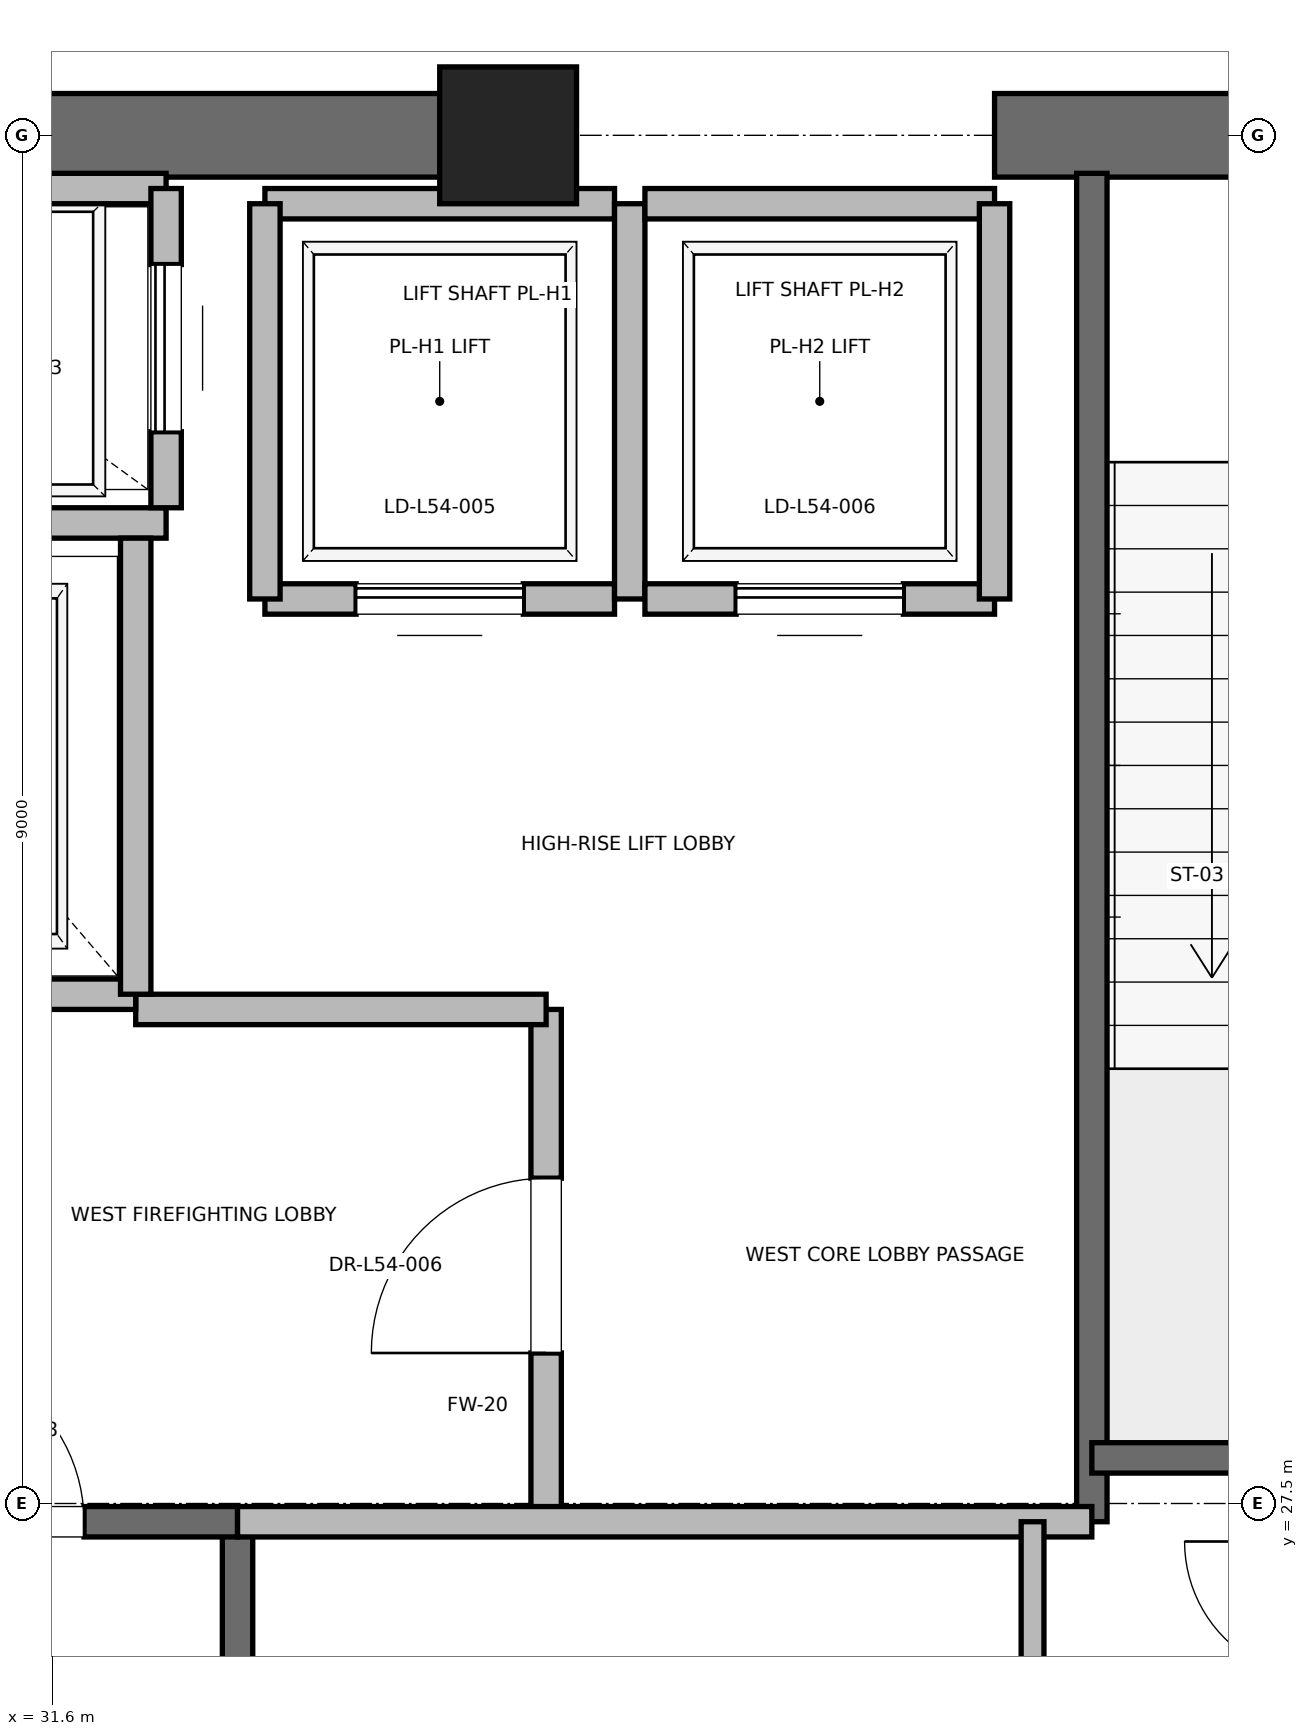
"""IFC4 building model, lengths in metres.
Left out: names, types, materials, properties, quantities, classifications, styles, units other than length and angle.
Written with IfcOpenShell. Run it as: python <this file> out.ifc"""

import sys

from ifc_helpers import new_model, si_unit, direction, frame, frame_2d, origin, origin_2d, place, context, subcontext, project, spatial, rectangle, extrude, element, fill, save


model = new_model("IFC4")
c1 = context("Model", 3, precision=1e-05, world=origin(), true_north=direction((0.0, 1.0)))
c2 = subcontext(c1, "Body", "Model", "MODEL_VIEW")
j1 = project(units=[si_unit("LENGTHUNIT", "METRE"), si_unit("PLANEANGLEUNIT", "RADIAN")], contexts=[c1])
p1 = place(None, origin())
s1 = spatial("IfcSite", under=j1, at=p1, CompositionType="ELEMENT")
p2 = place(p1, origin())
s2 = spatial("IfcBuilding", under=s1, at=p2, CompositionType="ELEMENT")
p3 = place(p2, frame((0.0, 0.0, 233.2)))
s3 = spatial("IfcBuildingStorey", under=s2, at=p3, CompositionType="ELEMENT", Elevation=233.2)
p4 = place(p3, frame((34.6, 36.5, 0.0), z_axis=(0.0, 0.0, 1.0), x_axis=(1.0, 0.0, 0.0)))
e1 = element("IfcColumn", 1, at=p4, inside=s3, PredefinedType="PILASTER", context=c2, shape_type="SweptSolid", body=[
    extrude(rectangle(XDim=0.9, YDim=0.9, at=origin_2d()), origin(), (0.0, 0.0, 1.0), 5.0),
])
p5 = place(p3, frame((29.0, 36.5, 0.0), z_axis=(0.0, 0.0, 1.0), x_axis=(1.0, 0.0, 0.0)))
e2 = element("IfcWall", 2, at=p5, inside=s3, PredefinedType="SHEAR", context=c2, shape_type="SweptSolid", body=[
    extrude(rectangle(XDim=5.8, YDim=0.55, at=frame_2d((2.9, 0.0))), origin(), (0.0, 0.0, 1.0), 4.7),
])
p6 = place(p3, frame((37.8, 36.5, 0.0), z_axis=(0.0, 0.0, 1.0), x_axis=(1.0, 0.0, 0.0)))
e3 = element("IfcWall", 3, at=p6, inside=s3, PredefinedType="SHEAR", context=c2, shape_type="SweptSolid", body=[
    extrude(rectangle(XDim=4.4, YDim=0.55, at=frame_2d((2.2, 0.0))), origin(), (0.0, 0.0, 1.0), 4.7),
])
p7 = place(p6, frame((1.65, 0.0, 0.0)))
e4 = element("IfcOpeningElement", 4, at=p7, cuts=e3, PredefinedType="OPENING", context=c2, shape_type="SweptSolid", body=[
    extrude(rectangle(XDim=1.1, YDim=2.15, at=frame_2d((0.55, 1.075))), frame((0.0, 0.275, 0.0), z_axis=(0.0, -1.0, 0.0), x_axis=(1.0, 0.0, 0.0)), (0.0, 0.0, 1.0), 0.55),
])
p8 = place(p3, frame((32.82, 18.6, 0.0), z_axis=(0.0, 0.0, 1.0), x_axis=(0.0, 1.0, 0.0)))
e5 = element("IfcWall", 5, at=p8, inside=s3, PredefinedType="SOLIDWALL", context=c2, shape_type="SweptSolid", body=[
    extrude(rectangle(XDim=8.78, YDim=0.2, at=frame_2d((4.39, 0.0))), origin(), (0.0, 0.0, 1.0), 4.7),
])
p9 = place(p3, frame((29.7, 27.38, 0.0), z_axis=(0.0, 0.0, 1.0), x_axis=(1.0, 0.0, 0.0)))
e6 = element("IfcWall", 6, at=p9, inside=s3, PredefinedType="SOLIDWALL", context=c2, shape_type="SweptSolid", body=[
    extrude(rectangle(XDim=3.12, YDim=0.2, at=frame_2d((1.56, 0.0))), origin(), (0.0, 0.0, 1.0), 4.7),
])
p10 = place(p9, frame((1.01, 0.0, 0.0)))
e7 = element("IfcOpeningElement", 7, at=p10, cuts=e6, PredefinedType="OPENING", context=c2, shape_type="SweptSolid", body=[
    extrude(rectangle(XDim=1.1, YDim=2.15, at=frame_2d((0.55, 1.075))), frame((0.0, 0.1, 0.0), z_axis=(0.0, -1.0, 0.0), x_axis=(1.0, 0.0, 0.0)), (0.0, 0.0, 1.0), 0.2),
])
p11 = place(p3, frame((38.44, 27.38, 0.0), z_axis=(0.0, 0.0, 1.0), x_axis=(0.0, 1.0, 0.0)))
e8 = element("IfcWall", 8, at=p11, inside=s3, PredefinedType="SOLIDWALL", context=c2, shape_type="SweptSolid", body=[
    extrude(rectangle(XDim=8.87, YDim=0.2, at=frame_2d((4.435, 0.0))), origin(), (0.0, 0.0, 1.0), 4.7),
])
p12 = place(p3, frame((38.44, 27.8, 0.0), z_axis=(0.0, 0.0, 1.0), x_axis=(1.0, 0.0, 0.0)))
e9 = element("IfcWall", 9, at=p12, inside=s3, PredefinedType="SOLIDWALL", context=c2, shape_type="SweptSolid", body=[
    extrude(rectangle(XDim=3.32, YDim=0.2, at=frame_2d((1.66, 0.0))), origin(), (0.0, 0.0, 1.0), 4.7),
])
p13 = place(p3, frame((34.85, 27.38, 0.0), z_axis=(0.0, 0.0, 1.0), x_axis=(0.0, 1.0, 0.0)))
e10 = element("IfcWall", 10, at=p13, inside=s3, PredefinedType="PARTITIONING", context=c2, shape_type="SweptSolid", body=[
    extrude(rectangle(XDim=3.37, YDim=0.2, at=frame_2d((1.685, 0.0))), origin(), (0.0, 0.0, 1.0), 4.7),
])
p14 = place(p13, frame((1.11, 0.0, 0.0)))
e11 = element("IfcOpeningElement", 11, at=p14, cuts=e10, PredefinedType="OPENING", context=c2, shape_type="SweptSolid", body=[
    extrude(rectangle(XDim=1.15, YDim=2.2, at=frame_2d((0.575, 1.1))), frame((0.0, 0.1, 0.0), z_axis=(0.0, -1.0, 0.0), x_axis=(1.0, 0.0, 0.0)), (0.0, 0.0, 1.0), 0.2),
])
p15 = place(p3, frame((32.82, 27.38, 0.0), z_axis=(0.0, 0.0, 1.0), x_axis=(1.0, 0.0, 0.0)))
e12 = element("IfcWall", 12, at=p15, inside=s3, PredefinedType="PARTITIONING", context=c2, shape_type="SweptSolid", body=[
    extrude(rectangle(XDim=5.62, YDim=0.2, at=frame_2d((2.81, 0.0))), origin(), (0.0, 0.0, 1.0), 4.7),
])
p16 = place(p3, frame((32.15, 30.75, 0.0), z_axis=(0.0, 0.0, 1.0), x_axis=(1.0, 0.0, 0.0)))
e13 = element("IfcWall", 13, at=p16, inside=s3, PredefinedType="PARTITIONING", context=c2, shape_type="SweptSolid", body=[
    extrude(rectangle(XDim=2.7, YDim=0.2, at=frame_2d((1.35, 0.0))), origin(), (0.0, 0.0, 1.0), 4.7),
])
p17 = place(p3, frame((29.55, 30.85, 0.0), z_axis=(0.0, 0.0, 1.0), x_axis=(1.0, 0.0, 0.0)))
e14 = element("IfcWall", 14, at=p17, inside=s3, PredefinedType="SOLIDWALL", context=c2, shape_type="SweptSolid", body=[
    extrude(rectangle(XDim=2.6, YDim=0.2, at=frame_2d((1.3, 0.0))), origin(), (0.0, 0.0, 1.0), 3.68),
])
p18 = place(p17, frame((0.75, 0.0, 0.0)))
e15 = element("IfcOpeningElement", 15, at=p18, cuts=e14, PredefinedType="OPENING", context=c2, shape_type="SweptSolid", body=[
    extrude(rectangle(XDim=1.1, YDim=2.2, at=frame_2d((0.55, 1.1))), frame((0.0, 0.1, 0.0), z_axis=(0.0, -1.0, 0.0), x_axis=(1.0, 0.0, 0.0)), (0.0, 0.0, 1.0), 0.2),
])
p19 = place(p3, frame((29.55, 33.95, 0.0), z_axis=(0.0, 0.0, 1.0), x_axis=(1.0, 0.0, 0.0)))
e16 = element("IfcWall", 16, at=p19, inside=s3, PredefinedType="SOLIDWALL", context=c2, shape_type="SweptSolid", body=[
    extrude(rectangle(XDim=2.8, YDim=0.2, at=frame_2d((1.4, 0.0))), origin(), (0.0, 0.0, 1.0), 4.7),
])
p20 = place(p3, frame((32.15, 30.85, 0.0), z_axis=(0.0, 0.0, 1.0), x_axis=(0.0, 1.0, 0.0)))
e17 = element("IfcWall", 17, at=p20, inside=s3, PredefinedType="SOLIDWALL", context=c2, shape_type="SweptSolid", body=[
    extrude(rectangle(XDim=3.0, YDim=0.2, at=frame_2d((1.5, 0.0))), origin(), (0.0, 0.0, 1.0), 4.7),
])
p21 = place(p3, frame((32.35, 36.15, 0.0), z_axis=(0.0, 0.0, 1.0), x_axis=(-1.0, 0.0, 0.0)))
e18 = element("IfcWall", 18, at=p21, inside=s3, PredefinedType="SOLIDWALL", context=c2, shape_type="SweptSolid", body=[
    extrude(rectangle(XDim=2.8, YDim=0.2, at=frame_2d((1.4, 0.0))), origin(), (0.0, 0.0, 1.0), 3.987),
])
p22 = place(p3, frame((32.35, 34.05, 0.0), z_axis=(0.0, 0.0, 1.0), x_axis=(0.0, 1.0, 0.0)))
e19 = element("IfcWall", 19, at=p22, inside=s3, PredefinedType="SOLIDWALL", context=c2, shape_type="SweptSolid", body=[
    extrude(rectangle(XDim=2.1, YDim=0.2, at=frame_2d((1.05, 0.0))), origin(), (0.0, 0.0, 1.0), 4.7),
])
p23 = place(p22, frame((0.5, 0.0, 0.0)))
e20 = element("IfcOpeningElement", 20, at=p23, cuts=e19, PredefinedType="OPENING", context=c2, shape_type="SweptSolid", body=[
    extrude(rectangle(XDim=1.1, YDim=2.2, at=frame_2d((0.55, 1.1))), frame((0.0, 0.1, 0.0), z_axis=(0.0, -1.0, 0.0), x_axis=(1.0, 0.0, 0.0)), (0.0, 0.0, 1.0), 0.2),
])
p24 = place(p3, frame((33.0, 33.45, 0.0), z_axis=(0.0, 0.0, 1.0), x_axis=(1.0, 0.0, 0.0)))
e21 = element("IfcWall", 21, at=p24, inside=s3, PredefinedType="SOLIDWALL", context=c2, shape_type="SweptSolid", body=[
    extrude(rectangle(XDim=2.3, YDim=0.2, at=frame_2d((1.15, 0.0))), origin(), (0.0, 0.0, 1.0), 4.7),
])
p25 = place(p24, frame((0.6, 0.0, 0.0)))
e22 = element("IfcOpeningElement", 22, at=p25, cuts=e21, PredefinedType="OPENING", context=c2, shape_type="SweptSolid", body=[
    extrude(rectangle(XDim=1.1, YDim=2.2, at=frame_2d((0.55, 1.1))), frame((0.0, 0.1, 0.0), z_axis=(0.0, -1.0, 0.0), x_axis=(1.0, 0.0, 0.0)), (0.0, 0.0, 1.0), 0.2),
])
p26 = place(p3, frame((35.3, 36.05, 0.0), z_axis=(0.0, 0.0, 1.0), x_axis=(-1.0, 0.0, 0.0)))
e23 = element("IfcWall", 23, at=p26, inside=s3, PredefinedType="SOLIDWALL", context=c2, shape_type="SweptSolid", body=[
    extrude(rectangle(XDim=2.3, YDim=0.2, at=frame_2d((1.15, 0.0))), origin(), (0.0, 0.0, 1.0), 3.68),
])
p27 = place(p3, frame((33.0, 36.05, 0.0), z_axis=(0.0, 0.0, 1.0), x_axis=(0.0, -1.0, 0.0)))
e24 = element("IfcWall", 24, at=p27, inside=s3, PredefinedType="SOLIDWALL", context=c2, shape_type="SweptSolid", body=[
    extrude(rectangle(XDim=2.6, YDim=0.2, at=frame_2d((1.3, 0.0))), origin(), (0.0, 0.0, 1.0), 4.7),
])
p28 = place(p3, frame((35.4, 33.45, 0.0), z_axis=(0.0, 0.0, 1.0), x_axis=(0.0, 1.0, 0.0)))
e25 = element("IfcWall", 25, at=p28, inside=s3, PredefinedType="SOLIDWALL", context=c2, shape_type="SweptSolid", body=[
    extrude(rectangle(XDim=2.6, YDim=0.2, at=frame_2d((1.3, 0.0))), origin(), (0.0, 0.0, 1.0), 3.68),
])
p29 = place(p3, frame((35.5, 33.45, 0.0), z_axis=(0.0, 0.0, 1.0), x_axis=(1.0, 0.0, 0.0)))
e26 = element("IfcWall", 26, at=p29, inside=s3, PredefinedType="SOLIDWALL", context=c2, shape_type="SweptSolid", body=[
    extrude(rectangle(XDim=2.3, YDim=0.2, at=frame_2d((1.15, 0.0))), origin(), (0.0, 0.0, 1.0), 4.7),
])
p30 = place(p29, frame((0.6, 0.0, 0.0)))
e27 = element("IfcOpeningElement", 27, at=p30, cuts=e26, PredefinedType="OPENING", context=c2, shape_type="SweptSolid", body=[
    extrude(rectangle(XDim=1.1, YDim=2.2, at=frame_2d((0.55, 1.1))), frame((0.0, 0.1, 0.0), z_axis=(0.0, -1.0, 0.0), x_axis=(1.0, 0.0, 0.0)), (0.0, 0.0, 1.0), 0.2),
])
p31 = place(p3, frame((37.8, 36.05, 0.0), z_axis=(0.0, 0.0, 1.0), x_axis=(-1.0, 0.0, 0.0)))
e28 = element("IfcWall", 28, at=p31, inside=s3, PredefinedType="SOLIDWALL", context=c2, shape_type="SweptSolid", body=[
    extrude(rectangle(XDim=2.3, YDim=0.2, at=frame_2d((1.15, 0.0))), origin(), (0.0, 0.0, 1.0), 3.68),
])
p32 = place(p3, frame((37.8, 33.45, 0.0), z_axis=(0.0, 0.0, 1.0), x_axis=(0.0, 1.0, 0.0)))
e29 = element("IfcWall", 29, at=p32, inside=s3, PredefinedType="SOLIDWALL", context=c2, shape_type="SweptSolid", body=[
    extrude(rectangle(XDim=2.6, YDim=0.2, at=frame_2d((1.3, 0.0))), origin(), (0.0, 0.0, 1.0), 3.68),
])
p33 = place(p3, frame((38.05, 24.5, 0.0), z_axis=(0.0, 0.0, 1.0), x_axis=(0.0, 1.0, 0.0)))
e30 = element("IfcWall", 30, at=p33, inside=s3, PredefinedType="PARTITIONING", context=c2, shape_type="SweptSolid", body=[
    extrude(rectangle(XDim=2.88, YDim=0.15, at=frame_2d((1.44, 0.0))), origin(), (0.0, 0.0, 1.0), 2.85),
])
p34 = place(p33, frame((0.94, 0.0, 0.0)))
e31 = element("IfcOpeningElement", 31, at=p34, cuts=e30, PredefinedType="OPENING", context=c2, shape_type="SweptSolid", body=[
    extrude(rectangle(XDim=1.0, YDim=2.15, at=frame_2d((0.5, 1.075))), frame((0.0, 0.075, 0.0), z_axis=(0.0, -1.0, 0.0), x_axis=(1.0, 0.0, 0.0)), (0.0, 0.0, 1.0), 0.15),
])
p35 = place(p10, origin())
e32 = element("IfcDoor", 32, at=p35, inside=s3, OperationType="SINGLE_SWING_LEFT", PredefinedType="DOOR", context=c2, shape_type="SweptSolid", body=[
    extrude(rectangle(XDim=1.1, YDim=2.15, at=frame_2d((0.55, 1.075))), frame((0.0, 0.025, 0.0), z_axis=(0.0, -1.0, 0.0), x_axis=(1.0, 0.0, 0.0)), (0.0, 0.0, 1.0), 0.05),
])
fill(e7, e32)
p36 = place(p14, origin())
e33 = element("IfcDoor", 33, at=p36, inside=s3, OperationType="SINGLE_SWING_LEFT", PredefinedType="DOOR", context=c2, shape_type="SweptSolid", body=[
    extrude(rectangle(XDim=1.15, YDim=2.2, at=frame_2d((0.575, 1.1))), frame((0.0, 0.025, 0.0), z_axis=(0.0, -1.0, 0.0), x_axis=(1.0, 0.0, 0.0)), (0.0, 0.0, 1.0), 0.05),
])
fill(e11, e33)
p37 = place(p23, origin())
e34 = element("IfcDoor", 34, at=p37, inside=s3, OperationType="SLIDING_TO_RIGHT", PredefinedType="DOOR", context=c2, shape_type="SweptSolid", body=[
    extrude(rectangle(XDim=1.1, YDim=2.2, at=frame_2d((0.55, 1.1))), frame((0.0, 0.025, 0.0), z_axis=(0.0, -1.0, 0.0), x_axis=(1.0, 0.0, 0.0)), (0.0, 0.0, 1.0), 0.05),
])
fill(e20, e34)
p38 = place(p25, origin())
e35 = element("IfcDoor", 35, at=p38, inside=s3, OperationType="SLIDING_TO_RIGHT", PredefinedType="DOOR", context=c2, shape_type="SweptSolid", body=[
    extrude(rectangle(XDim=1.1, YDim=2.2, at=frame_2d((0.55, 1.1))), frame((0.0, 0.025, 0.0), z_axis=(0.0, -1.0, 0.0), x_axis=(1.0, 0.0, 0.0)), (0.0, 0.0, 1.0), 0.05),
])
fill(e22, e35)
p39 = place(p30, origin())
e36 = element("IfcDoor", 36, at=p39, inside=s3, OperationType="SLIDING_TO_RIGHT", PredefinedType="DOOR", context=c2, shape_type="SweptSolid", body=[
    extrude(rectangle(XDim=1.1, YDim=2.2, at=frame_2d((0.55, 1.1))), frame((0.0, 0.025, 0.0), z_axis=(0.0, -1.0, 0.0), x_axis=(1.0, 0.0, 0.0)), (0.0, 0.0, 1.0), 0.05),
])
fill(e27, e36)
save(model, sys.argv[1])
